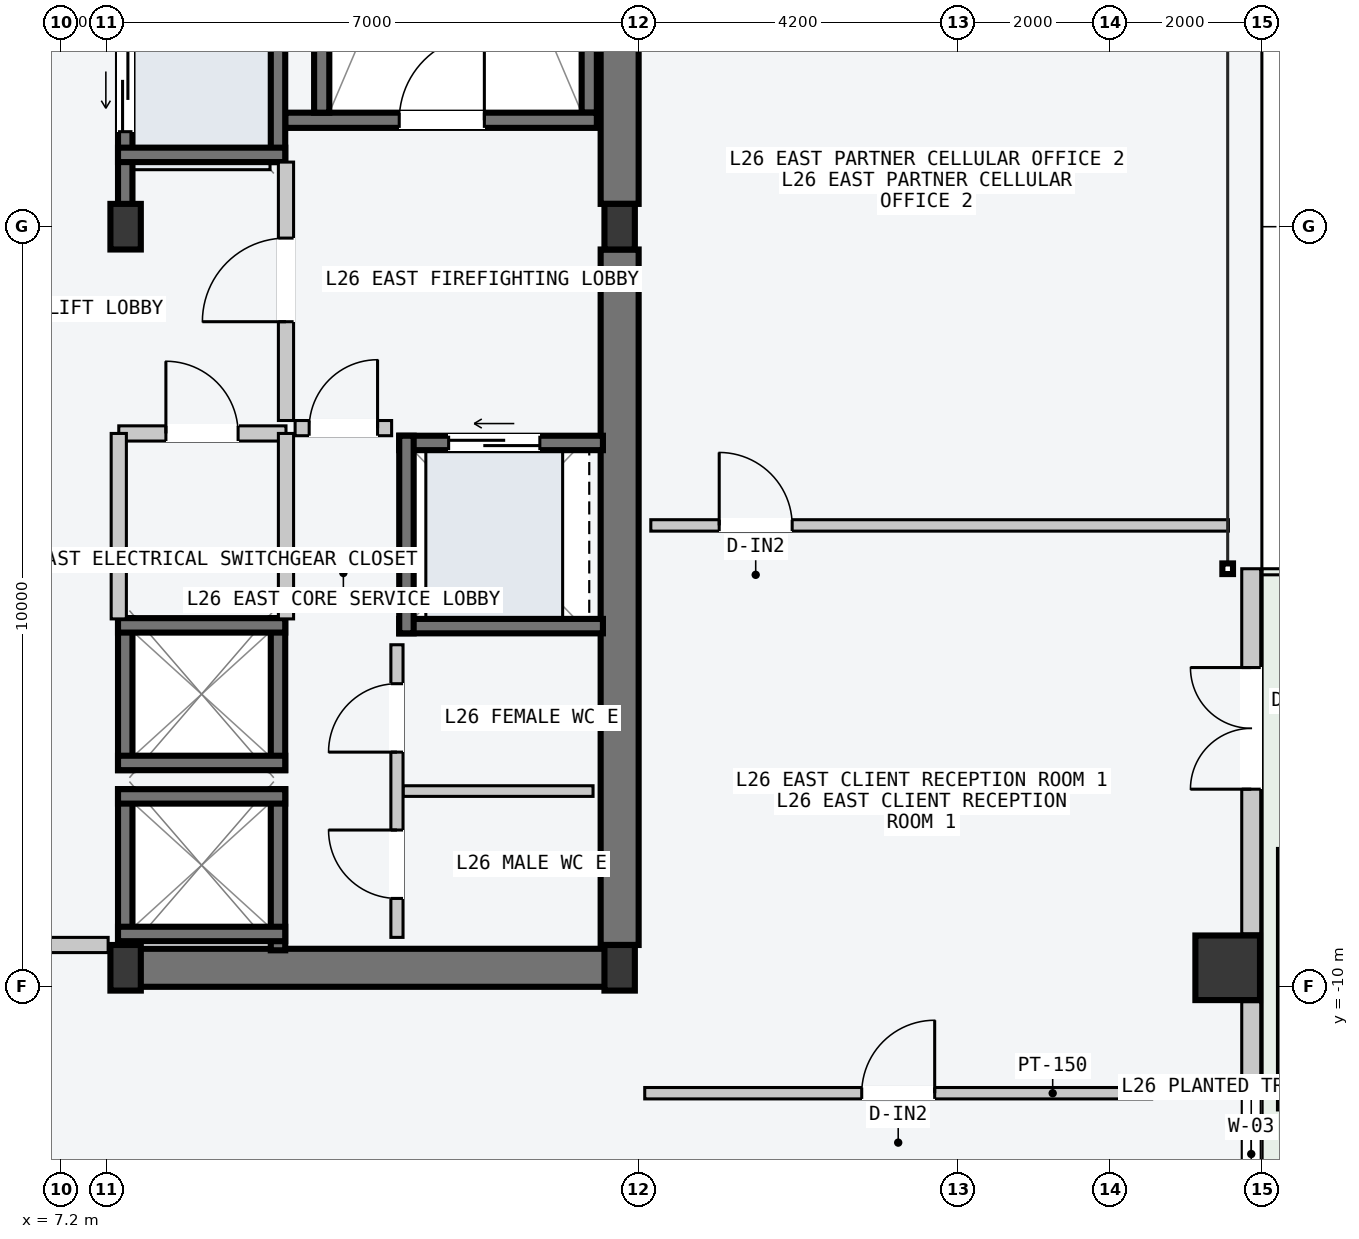
"""IFC4 building model, lengths in metres.
Left out: names, types, materials, properties, quantities, classifications, styles, units other than length and angle.
Written with IfcOpenShell. Run it as: python <this file> out.ifc"""

import sys

from ifc_helpers import new_model, si_unit, direction, frame, frame_2d, origin, origin_2d, place, context, subcontext, project, spatial, rectangle, hollow_rectangle, i_section, extrude, element, fill, save


model = new_model("IFC4")
c1 = context("Model", 3, precision=1e-05, world=origin(), true_north=direction((0.0, 1.0)))
c2 = subcontext(c1, "Body", "Model", "MODEL_VIEW")
j1 = project(units=[si_unit("LENGTHUNIT", "METRE"), si_unit("PLANEANGLEUNIT", "RADIAN")], contexts=[c1])
p1 = place(None, origin())
s1 = spatial("IfcSite", under=j1, at=p1, CompositionType="ELEMENT")
p2 = place(p1, origin())
s2 = spatial("IfcBuilding", under=s1, at=p2, CompositionType="ELEMENT")
p3 = place(p2, frame((0.0, 0.0, 102.6)))
s3 = spatial("IfcBuildingStorey", under=s2, at=p3, CompositionType="ELEMENT", Elevation=102.6)
p4 = place(p3, frame((8.07, -9.75, -0.2), z_axis=(0.0, 0.0, 1.0), x_axis=(1.0, 0.0, 0.0)))
e1 = element("IfcWall", 1, at=p4, inside=s3, PredefinedType="SHEAR", context=c2, shape_type="SweptSolid", body=[
    extrude(rectangle(XDim=6.46, YDim=0.5, at=frame_2d((3.23, 0.0))), origin(), (0.0, 0.0, 1.0), 3.6),
])
for number, where, z_axis, x_axis in (
    (2, (14.55, -9.45, -0.2), (0.0, 0.0, 1.0), (0.0, 1.0, 0.0)),
    (3, (14.55, 0.3, -0.2), (0.0, 0.0, 1.0), (0.0, 1.0, 0.0)),
):
    element("IfcWall", number, at=place(p3, frame(where, z_axis=z_axis, x_axis=x_axis)), inside=s3, PredefinedType="SHEAR", context=c2, shape_type="SweptSolid", body=[
        extrude(rectangle(XDim=9.15, YDim=0.5, at=frame_2d((4.575, 0.0))), origin(), (0.0, 0.0, 1.0), 3.6),
    ])
p5 = place(p3, frame((14.15, 1.5, -0.2), z_axis=(0.0, 0.0, 1.0), x_axis=(0.0, 1.0, 0.0)))
e4 = element("IfcWall", 4, at=p5, inside=s3, PredefinedType="SOLIDWALL", context=c2, shape_type="SweptSolid", body=[
    extrude(rectangle(XDim=7.8, YDim=0.2, at=frame_2d((3.9, 0.0))), origin(), (0.0, 0.0, 1.0), 3.6),
])
p6 = place(p3, frame((10.15, 1.4, -0.2), z_axis=(0.0, 0.0, 1.0), x_axis=(1.0, 0.0, 0.0)))
e5 = element("IfcWall", 5, at=p6, inside=s3, PredefinedType="SOLIDWALL", context=c2, shape_type="SweptSolid", body=[
    extrude(rectangle(XDim=4.1, YDim=0.2, at=frame_2d((2.05, 0.0))), origin(), (0.0, 0.0, 1.0), 3.6),
])
p7 = place(p6, frame((1.5, 0.0, 0.2)))
e6 = element("IfcOpeningElement", 6, at=p7, cuts=e5, PredefinedType="OPENING", context=c2, shape_type="SweptSolid", body=[
    extrude(rectangle(XDim=1.12, YDim=2.18, at=frame_2d((0.56, 1.09))), frame((0.0, 0.11, 0.0), z_axis=(0.0, -1.0, 0.0), x_axis=(1.0, 0.0, 0.0)), (0.0, 0.0, 1.0), 0.22),
])
p8 = place(p3, frame((10.63, 1.5, -0.2), z_axis=(0.0, 0.0, 1.0), x_axis=(0.0, 1.0, 0.0)))
e7 = element("IfcWall", 7, at=p8, inside=s3, PredefinedType="SOLIDWALL", context=c2, shape_type="SweptSolid", body=[
    extrude(rectangle(XDim=7.8, YDim=0.2, at=frame_2d((3.9, 0.0))), origin(), (0.0, 0.0, 1.0), 3.6),
])
for number, where, z_axis, x_axis in (
    (8, (8.05, -9.75, 0.0), (0.0, 0.0, 1.0), (1.0, 0.0, 0.0)),
    (9, (8.05, 0.0, 0.0), (0.0, 0.0, 1.0), (1.0, 0.0, 0.0)),
    (10, (14.55, -9.75, 0.0), (0.0, 0.0, 1.0), (1.0, 0.0, 0.0)),
    (11, (14.55, 0.0, 0.0), (0.0, 0.0, 1.0), (1.0, 0.0, 0.0)),
):
    element("IfcColumn", number, at=place(p3, frame(where, z_axis=z_axis, x_axis=x_axis)), inside=s3, PredefinedType="COLUMN", context=c2, shape_type="SweptSolid", body=[
        extrude(i_section(OverallWidth=0.4, OverallDepth=0.6, WebThickness=0.022, FlangeThickness=0.036, at=origin_2d()), origin(), (0.0, 0.0, 1.0), 3.6),
    ])
p9 = place(p3, frame((22.55, -9.75, 0.0), z_axis=(0.0, 0.0, 1.0), x_axis=(0.0, 1.0, 0.0)))
e12 = element("IfcColumn", 12, at=p9, inside=s3, PredefinedType="COLUMN", context=c2, shape_type="SweptSolid", body=[
    extrude(hollow_rectangle(XDim=0.85, YDim=0.85, WallThickness=0.04, at=origin_2d()), origin(), (0.0, 0.0, 1.0), 3.6),
])
p10 = place(p3, frame((22.86, -14.605, 0.0), z_axis=(0.0, 0.0, 1.0), x_axis=(0.0, 1.0, 0.0)))
e13 = element("IfcWall", 13, at=p10, inside=s3, PredefinedType="STANDARD", context=c2, shape_type="SweptSolid", body=[
    extrude(rectangle(XDim=4.41, YDim=0.25, at=frame_2d((2.205, 0.0))), origin(), (0.0, 0.0, 1.0), 3.4),
])
p11 = place(p10, frame((1.405, 0.0, 0.85)))
e14 = element("IfcOpeningElement", 14, at=p11, cuts=e13, PredefinedType="OPENING", context=c2, shape_type="SweptSolid", body=[
    extrude(rectangle(XDim=2.0, YDim=2.1, at=frame_2d((1.0, 1.05))), frame((0.0, 0.135, 0.0), z_axis=(0.0, -1.0, 0.0), x_axis=(1.0, 0.0, 0.0)), (0.0, 0.0, 1.0), 0.27),
])
p12 = place(p3, frame((22.86, -9.305, 0.0), z_axis=(0.0, 0.0, 1.0), x_axis=(0.0, 1.0, 0.0)))
e15 = element("IfcWall", 15, at=p12, inside=s3, PredefinedType="STANDARD", context=c2, shape_type="SweptSolid", body=[
    extrude(rectangle(XDim=4.805, YDim=0.25, at=frame_2d((2.402, 0.0))), origin(), (0.0, 0.0, 1.0), 3.4),
])
p13 = place(p12, frame((1.905, 0.0, 0.0)))
e16 = element("IfcOpeningElement", 16, at=p13, cuts=e15, PredefinedType="OPENING", context=c2, shape_type="SweptSolid", body=[
    extrude(rectangle(XDim=1.6, YDim=2.2, at=frame_2d((0.8, 1.1))), frame((0.0, 0.135, 0.0), z_axis=(0.0, -1.0, 0.0), x_axis=(1.0, 0.0, 0.0)), (0.0, 0.0, 1.0), 0.27),
])
p14 = place(p3, frame((8.045, 0.21, -0.2), z_axis=(0.0, 0.0, 1.0), x_axis=(0.0, 1.0, 0.0)))
e17 = element("IfcWall", 17, at=p14, inside=s3, PredefinedType="SOLIDWALL", context=c2, shape_type="SweptSolid", body=[
    extrude(rectangle(XDim=2.54, YDim=0.19, at=frame_2d((1.27, 0.0))), origin(), (0.0, 0.0, 1.0), 3.6),
])
p15 = place(p14, frame((1.04, 0.0, 0.2)))
e18 = element("IfcOpeningElement", 18, at=p15, cuts=e17, PredefinedType="OPENING", context=c2, shape_type="SweptSolid", body=[
    extrude(rectangle(XDim=1.1, YDim=2.2, at=frame_2d((0.55, 1.1))), frame((0.0, 0.105, 0.0), z_axis=(0.0, -1.0, 0.0), x_axis=(1.0, 0.0, 0.0)), (0.0, 0.0, 1.0), 0.21),
])
p16 = place(p3, frame((10.055, 0.85, -0.2), z_axis=(0.0, 0.0, 1.0), x_axis=(0.0, 1.0, 0.0)))
e19 = element("IfcWall", 19, at=p16, inside=s3, PredefinedType="SOLIDWALL", context=c2, shape_type="SweptSolid", body=[
    extrude(rectangle(XDim=1.9, YDim=0.19, at=frame_2d((0.95, 0.0))), origin(), (0.0, 0.0, 1.0), 3.6),
])
p17 = place(p3, frame((7.95, 0.945, -0.2), z_axis=(0.0, 0.0, 1.0), x_axis=(1.0, 0.0, 0.0)))
e20 = element("IfcWall", 20, at=p17, inside=s3, PredefinedType="SOLIDWALL", context=c2, shape_type="SweptSolid", body=[
    extrude(rectangle(XDim=2.2, YDim=0.19, at=frame_2d((1.1, 0.0))), origin(), (0.0, 0.0, 1.0), 3.6),
])
for number, where, z_axis, x_axis in (
    (21, (8.045, -9.52, -0.2), (0.0, 0.0, 1.0), (0.0, 1.0, 0.0)),
    (22, (10.055, -9.52, -0.2), (0.0, 0.0, 1.0), (0.0, 1.0, 0.0)),
):
    element("IfcWall", number, at=place(p3, frame(where, z_axis=z_axis, x_axis=x_axis)), inside=s3, PredefinedType="SOLIDWALL", context=c2, shape_type="SweptSolid", body=[
        extrude(rectangle(XDim=2.12, YDim=0.19, at=frame_2d((1.06, 0.0))), origin(), (0.0, 0.0, 1.0), 3.6),
    ])
for number, where, z_axis, x_axis in (
    (23, (7.95, -7.495, -0.2), (0.0, 0.0, 1.0), (1.0, 0.0, 0.0)),
    (24, (7.95, -9.305, -0.2), (0.0, 0.0, 1.0), (1.0, 0.0, 0.0)),
):
    element("IfcWall", number, at=place(p3, frame(where, z_axis=z_axis, x_axis=x_axis)), inside=s3, PredefinedType="SOLIDWALL", context=c2, shape_type="SweptSolid", body=[
        extrude(rectangle(XDim=2.2, YDim=0.19, at=frame_2d((1.1, 0.0))), origin(), (0.0, 0.0, 1.0), 3.6),
    ])
for number, where, z_axis, x_axis in (
    (25, (8.045, -7.15, -0.2), (0.0, 0.0, 1.0), (0.0, 1.0, 0.0)),
    (26, (10.055, -7.15, -0.2), (0.0, 0.0, 1.0), (0.0, 1.0, 0.0)),
):
    element("IfcWall", number, at=place(p3, frame(where, z_axis=z_axis, x_axis=x_axis)), inside=s3, PredefinedType="SOLIDWALL", context=c2, shape_type="SweptSolid", body=[
        extrude(rectangle(XDim=2.0, YDim=0.19, at=frame_2d((1.0, 0.0))), origin(), (0.0, 0.0, 1.0), 3.6),
    ])
for number, where, z_axis, x_axis in (
    (27, (7.95, -5.245, -0.2), (0.0, 0.0, 1.0), (1.0, 0.0, 0.0)),
    (28, (7.95, -7.055, -0.2), (0.0, 0.0, 1.0), (1.0, 0.0, 0.0)),
):
    element("IfcWall", number, at=place(p3, frame(where, z_axis=z_axis, x_axis=x_axis)), inside=s3, PredefinedType="SOLIDWALL", context=c2, shape_type="SweptSolid", body=[
        extrude(rectangle(XDim=2.2, YDim=0.19, at=frame_2d((1.1, 0.0))), origin(), (0.0, 0.0, 1.0), 3.6),
    ])
p18 = place(p3, frame((11.65, -2.845, -0.2), z_axis=(0.0, 0.0, 1.0), x_axis=(1.0, 0.0, 0.0)))
e29 = element("IfcWall", 29, at=p18, inside=s3, PredefinedType="SOLIDWALL", context=c2, shape_type="SweptSolid", body=[
    extrude(rectangle(XDim=2.68, YDim=0.19, at=frame_2d((1.34, 0.0))), origin(), (0.0, 0.0, 1.0), 3.6),
])
p19 = place(p18, frame((0.65, 0.0, 0.2)))
e30 = element("IfcOpeningElement", 30, at=p19, cuts=e29, PredefinedType="OPENING", context=c2, shape_type="SweptSolid", body=[
    extrude(rectangle(XDim=1.2, YDim=2.2, at=frame_2d((0.6, 1.1))), frame((0.0, 0.105, 0.0), z_axis=(0.0, -1.0, 0.0), x_axis=(1.0, 0.0, 0.0)), (0.0, 0.0, 1.0), 0.21),
])
p20 = place(p3, frame((11.65, -5.255, -0.2), z_axis=(0.0, 0.0, 1.0), x_axis=(1.0, 0.0, 0.0)))
e31 = element("IfcWall", 31, at=p20, inside=s3, PredefinedType="SOLIDWALL", context=c2, shape_type="SweptSolid", body=[
    extrude(rectangle(XDim=2.68, YDim=0.19, at=frame_2d((1.34, 0.0))), origin(), (0.0, 0.0, 1.0), 3.6),
])
p21 = place(p3, frame((11.745, -5.35, -0.2), z_axis=(0.0, 0.0, 1.0), x_axis=(0.0, 1.0, 0.0)))
e32 = element("IfcWall", 32, at=p21, inside=s3, PredefinedType="SOLIDWALL", context=c2, shape_type="SweptSolid", body=[
    extrude(rectangle(XDim=2.6, YDim=0.19, at=frame_2d((1.3, 0.0))), origin(), (0.0, 0.0, 1.0), 3.6),
])
p22 = place(p3, frame((6.02, -9.45, 0.0), z_axis=(0.0, 0.0, 1.0), x_axis=(1.0, 0.0, 0.0)))
e33 = element("IfcWall", 33, at=p22, inside=s3, PredefinedType="PARTITIONING", context=c2, shape_type="SweptSolid", body=[
    extrude(rectangle(XDim=1.8, YDim=0.2, at=frame_2d((0.9, 0.0))), origin(), (0.0, 0.0, 1.0), 3.4),
])
p23 = place(p3, frame((10.16, -2.55, 0.0), z_axis=(0.0, 0.0, 1.0), x_axis=(0.0, 1.0, 0.0)))
e34 = element("IfcWall", 34, at=p23, inside=s3, PredefinedType="PARTITIONING", context=c2, shape_type="SweptSolid", body=[
    extrude(rectangle(XDim=3.4, YDim=0.2, at=frame_2d((1.7, 0.0))), origin(), (0.0, 0.0, 1.0), 3.4),
])
p24 = place(p23, frame((1.3, 0.0, 0.0)))
e35 = element("IfcOpeningElement", 35, at=p24, cuts=e34, PredefinedType="OPENING", context=c2, shape_type="SweptSolid", body=[
    extrude(rectangle(XDim=1.1, YDim=2.15, at=frame_2d((0.55, 1.075))), frame((0.0, 0.11, 0.0), z_axis=(0.0, -1.0, 0.0), x_axis=(1.0, 0.0, 0.0)), (0.0, 0.0, 1.0), 0.22),
])
p25 = place(p3, frame((10.28, -2.65, 0.0), z_axis=(0.0, 0.0, 1.0), x_axis=(1.0, 0.0, 0.0)))
e36 = element("IfcWall", 36, at=p25, inside=s3, PredefinedType="PARTITIONING", context=c2, shape_type="SweptSolid", body=[
    extrude(rectangle(XDim=1.27, YDim=0.2, at=frame_2d((0.635, 0.0))), origin(), (0.0, 0.0, 1.0), 3.4),
])
p26 = place(p25, frame((0.185, 0.0, 0.0)))
e37 = element("IfcOpeningElement", 37, at=p26, cuts=e36, PredefinedType="OPENING", context=c2, shape_type="SweptSolid", body=[
    extrude(rectangle(XDim=0.9, YDim=2.15, at=frame_2d((0.45, 1.075))), frame((0.0, 0.11, 0.0), z_axis=(0.0, -1.0, 0.0), x_axis=(1.0, 0.0, 0.0)), (0.0, 0.0, 1.0), 0.22),
])
p27 = place(p3, frame((7.96, -2.72, 0.0), z_axis=(0.0, 0.0, 1.0), x_axis=(1.0, 0.0, 0.0)))
e38 = element("IfcWall", 38, at=p27, inside=s3, PredefinedType="PARTITIONING", context=c2, shape_type="SweptSolid", body=[
    extrude(rectangle(XDim=2.2, YDim=0.2, at=frame_2d((1.1, 0.0))), origin(), (0.0, 0.0, 1.0), 3.4),
])
p28 = place(p27, frame((0.62, 0.0, 0.0)))
e39 = element("IfcOpeningElement", 39, at=p28, cuts=e38, PredefinedType="OPENING", context=c2, shape_type="SweptSolid", body=[
    extrude(rectangle(XDim=0.95, YDim=2.1, at=frame_2d((0.475, 1.05))), frame((0.0, 0.11, 0.0), z_axis=(0.0, -1.0, 0.0), x_axis=(1.0, 0.0, 0.0)), (0.0, 0.0, 1.0), 0.22),
])
for number, where, z_axis, x_axis in (
    (40, (7.96, -5.16, 0.0), (0.0, 0.0, 1.0), (0.0, 1.0, 0.0)),
    (41, (10.16, -5.16, 0.0), (0.0, 0.0, 1.0), (0.0, 1.0, 0.0)),
):
    element("IfcWall", number, at=place(p3, frame(where, z_axis=z_axis, x_axis=x_axis)), inside=s3, PredefinedType="PARTITIONING", context=c2, shape_type="SweptSolid", body=[
        extrude(rectangle(XDim=2.44, YDim=0.2, at=frame_2d((1.22, 0.0))), origin(), (0.0, 0.0, 1.0), 3.4),
    ])
p29 = place(p3, frame((11.7, -7.425, 0.0), z_axis=(0.0, 0.0, 1.0), x_axis=(1.0, 0.0, 0.0)))
e42 = element("IfcWall", 42, at=p29, inside=s3, PredefinedType="PARTITIONING", context=c2, shape_type="SweptSolid", body=[
    extrude(rectangle(XDim=2.5, YDim=0.14, at=frame_2d((1.25, 0.0))), origin(), (0.0, 0.0, 1.0), 3.4),
])
p30 = place(p3, frame((11.62, -9.35, 0.0), z_axis=(0.0, 0.0, 1.0), x_axis=(0.0, 1.0, 0.0)))
e43 = element("IfcWall", 43, at=p30, inside=s3, PredefinedType="PARTITIONING", context=c2, shape_type="SweptSolid", body=[
    extrude(rectangle(XDim=3.85, YDim=0.16, at=frame_2d((1.925, 0.0))), origin(), (0.0, 0.0, 1.0), 3.4),
])
p31 = place(p30, frame((0.512, 0.0, 0.0)))
e44 = element("IfcOpeningElement", 44, at=p31, cuts=e43, PredefinedType="OPENING", context=c2, shape_type="SweptSolid", body=[
    extrude(rectangle(XDim=0.9, YDim=2.15, at=frame_2d((0.45, 1.075))), frame((0.0, 0.09, 0.0), z_axis=(0.0, -1.0, 0.0), x_axis=(1.0, 0.0, 0.0)), (0.0, 0.0, 1.0), 0.18),
])
p32 = place(p30, frame((2.438, 0.0, 0.0)))
e45 = element("IfcOpeningElement", 45, at=p32, cuts=e43, PredefinedType="OPENING", context=c2, shape_type="SweptSolid", body=[
    extrude(rectangle(XDim=0.9, YDim=2.15, at=frame_2d((0.45, 1.075))), frame((0.0, 0.09, 0.0), z_axis=(0.0, -1.0, 0.0), x_axis=(1.0, 0.0, 0.0)), (0.0, 0.0, 1.0), 0.18),
])
p33 = place(p3, frame((14.88, -11.4, 0.0), z_axis=(0.0, 0.0, 1.0), x_axis=(1.0, 0.0, 0.0)))
e46 = element("IfcWall", 46, at=p33, inside=s3, PredefinedType="PARTITIONING", context=c2, shape_type="SweptSolid", body=[
    extrude(rectangle(XDim=6.67, YDim=0.15, at=frame_2d((3.335, 0.0))), origin(), (0.0, 0.0, 1.0), 3.4),
])
p34 = place(p33, frame((2.855, 0.0, 0.0)))
e47 = element("IfcOpeningElement", 47, at=p34, cuts=e46, PredefinedType="OPENING", context=c2, shape_type="SweptSolid", body=[
    extrude(rectangle(XDim=0.96, YDim=2.18, at=frame_2d((0.48, 1.09))), frame((0.0, 0.085, 0.0), z_axis=(0.0, -1.0, 0.0), x_axis=(1.0, 0.0, 0.0)), (0.0, 0.0, 1.0), 0.17),
])
p35 = place(p3, frame((14.96, -3.93, 0.0), z_axis=(0.0, 0.0, 1.0), x_axis=(1.0, 0.0, 0.0)))
e48 = element("IfcWall", 48, at=p35, inside=s3, PredefinedType="PARTITIONING", context=c2, shape_type="SweptSolid", body=[
    extrude(rectangle(XDim=7.6, YDim=0.15, at=frame_2d((3.8, 0.0))), origin(), (0.0, 0.0, 1.0), 3.4),
])
p36 = place(p35, frame((0.9, 0.0, 0.0)))
e49 = element("IfcOpeningElement", 49, at=p36, cuts=e48, PredefinedType="OPENING", context=c2, shape_type="SweptSolid", body=[
    extrude(rectangle(XDim=0.96, YDim=2.18, at=frame_2d((0.48, 1.09))), frame((0.0, 0.085, 0.0), z_axis=(0.0, -1.0, 0.0), x_axis=(1.0, 0.0, 0.0)), (0.0, 0.0, 1.0), 0.17),
])
p37 = place(p7, origin())
e50 = element("IfcDoor", 50, at=p37, inside=s3, OperationType="SINGLE_SWING_RIGHT", PredefinedType="DOOR", context=c2, shape_type="SweptSolid", body=[
    extrude(rectangle(XDim=1.12, YDim=2.18, at=frame_2d((0.56, 1.09))), frame((0.0, 0.025, 0.0), z_axis=(0.0, -1.0, 0.0), x_axis=(1.0, 0.0, 0.0)), (0.0, 0.0, 1.0), 0.05),
])
fill(e6, e50)
p38 = place(p11, origin())
e51 = element("IfcWindow", 51, at=p38, inside=s3, PartitioningType="SINGLE_PANEL", PredefinedType="WINDOW", context=c2, shape_type="SweptSolid", body=[
    extrude(rectangle(XDim=2.0, YDim=2.1, at=frame_2d((1.0, 1.05))), frame((0.0, 0.03, 0.0), z_axis=(0.0, -1.0, 0.0), x_axis=(1.0, 0.0, 0.0)), (0.0, 0.0, 1.0), 0.06),
])
fill(e14, e51)
p39 = place(p13, origin())
e52 = element("IfcDoor", 52, at=p39, inside=s3, OperationType="DOUBLE_DOOR_SINGLE_SWING", PredefinedType="DOOR", context=c2, shape_type="SweptSolid", body=[
    extrude(rectangle(XDim=1.6, YDim=2.2, at=frame_2d((0.8, 1.1))), frame((0.0, 0.025, 0.0), z_axis=(0.0, -1.0, 0.0), x_axis=(1.0, 0.0, 0.0)), (0.0, 0.0, 1.0), 0.05),
])
fill(e16, e52)
p40 = place(p15, origin())
e53 = element("IfcDoor", 53, at=p40, inside=s3, OperationType="SLIDING_TO_LEFT", PredefinedType="DOOR", context=c2, shape_type="SweptSolid", body=[
    extrude(rectangle(XDim=1.1, YDim=2.2, at=frame_2d((0.55, 1.1))), frame((0.0, 0.025, 0.0), z_axis=(0.0, -1.0, 0.0), x_axis=(1.0, 0.0, 0.0)), (0.0, 0.0, 1.0), 0.05),
])
fill(e18, e53)
p41 = place(p19, origin())
e54 = element("IfcDoor", 54, at=p41, inside=s3, OperationType="SLIDING_TO_LEFT", PredefinedType="DOOR", context=c2, shape_type="SweptSolid", body=[
    extrude(rectangle(XDim=1.2, YDim=2.2, at=frame_2d((0.6, 1.1))), frame((0.0, 0.025, 0.0), z_axis=(0.0, -1.0, 0.0), x_axis=(1.0, 0.0, 0.0)), (0.0, 0.0, 1.0), 0.05),
])
fill(e30, e54)
p42 = place(p24, origin())
e55 = element("IfcDoor", 55, at=p42, inside=s3, OperationType="SINGLE_SWING_LEFT", PredefinedType="DOOR", context=c2, shape_type="SweptSolid", body=[
    extrude(rectangle(XDim=1.1, YDim=2.15, at=frame_2d((0.55, 1.075))), frame((0.0, 0.025, 0.0), z_axis=(0.0, -1.0, 0.0), x_axis=(1.0, 0.0, 0.0)), (0.0, 0.0, 1.0), 0.05),
])
fill(e35, e55)
p43 = place(p26, origin())
e56 = element("IfcDoor", 56, at=p43, inside=s3, OperationType="SINGLE_SWING_RIGHT", PredefinedType="DOOR", context=c2, shape_type="SweptSolid", body=[
    extrude(rectangle(XDim=0.9, YDim=2.15, at=frame_2d((0.45, 1.075))), frame((0.0, 0.025, 0.0), z_axis=(0.0, -1.0, 0.0), x_axis=(1.0, 0.0, 0.0)), (0.0, 0.0, 1.0), 0.05),
])
fill(e37, e56)
p44 = place(p28, origin())
e57 = element("IfcDoor", 57, at=p44, inside=s3, OperationType="SINGLE_SWING_LEFT", PredefinedType="DOOR", context=c2, shape_type="SweptSolid", body=[
    extrude(rectangle(XDim=0.95, YDim=2.1, at=frame_2d((0.475, 1.05))), frame((0.0, 0.025, 0.0), z_axis=(0.0, -1.0, 0.0), x_axis=(1.0, 0.0, 0.0)), (0.0, 0.0, 1.0), 0.05),
])
fill(e39, e57)
p45 = place(p31, origin())
e58 = element("IfcDoor", 58, at=p45, inside=s3, OperationType="SINGLE_SWING_RIGHT", PredefinedType="DOOR", context=c2, shape_type="SweptSolid", body=[
    extrude(rectangle(XDim=0.9, YDim=2.15, at=frame_2d((0.45, 1.075))), frame((0.0, 0.025, 0.0), z_axis=(0.0, -1.0, 0.0), x_axis=(1.0, 0.0, 0.0)), (0.0, 0.0, 1.0), 0.05),
])
fill(e44, e58)
p46 = place(p32, origin())
e59 = element("IfcDoor", 59, at=p46, inside=s3, OperationType="SINGLE_SWING_LEFT", PredefinedType="DOOR", context=c2, shape_type="SweptSolid", body=[
    extrude(rectangle(XDim=0.9, YDim=2.15, at=frame_2d((0.45, 1.075))), frame((0.0, 0.025, 0.0), z_axis=(0.0, -1.0, 0.0), x_axis=(1.0, 0.0, 0.0)), (0.0, 0.0, 1.0), 0.05),
])
fill(e45, e59)
p47 = place(p34, origin())
e60 = element("IfcDoor", 60, at=p47, inside=s3, OperationType="SINGLE_SWING_RIGHT", PredefinedType="DOOR", context=c2, shape_type="SweptSolid", body=[
    extrude(rectangle(XDim=0.96, YDim=2.18, at=frame_2d((0.48, 1.09))), frame((0.0, 0.025, 0.0), z_axis=(0.0, -1.0, 0.0), x_axis=(1.0, 0.0, 0.0)), (0.0, 0.0, 1.0), 0.05),
])
fill(e47, e60)
p48 = place(p36, origin())
e61 = element("IfcDoor", 61, at=p48, inside=s3, OperationType="SINGLE_SWING_LEFT", PredefinedType="DOOR", context=c2, shape_type="SweptSolid", body=[
    extrude(rectangle(XDim=0.96, YDim=2.18, at=frame_2d((0.48, 1.09))), frame((0.0, 0.025, 0.0), z_axis=(0.0, -1.0, 0.0), x_axis=(1.0, 0.0, 0.0)), (0.0, 0.0, 1.0), 0.05),
])
fill(e49, e61)
save(model, sys.argv[1])
